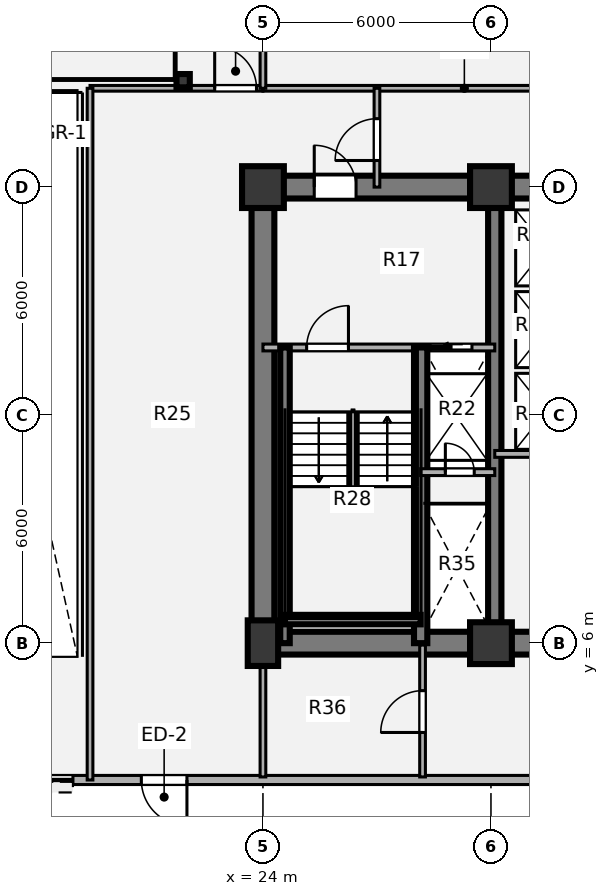
"""IFC4 building model, lengths in metres.
Left out: names, types, materials, properties, quantities, classifications, styles, units other than length and angle.
Written with IfcOpenShell. Run it as: python <this file> out.ifc"""

import sys

from ifc_helpers import new_model, si_unit, direction, frame, frame_2d, origin, origin_2d, place, context, subcontext, project, spatial, rectangle, hollow_rectangle, extrude, source, transform, mapped, element, fill, save


model = new_model("IFC4")
c1 = context("Model", 3, precision=1e-05, world=origin(), true_north=direction((0.0, 1.0)))
c2 = subcontext(c1, "Body", "Model", "MODEL_VIEW")
j1 = project(units=[si_unit("LENGTHUNIT", "METRE"), si_unit("PLANEANGLEUNIT", "RADIAN")], contexts=[c1])
p1 = place(None, origin())
s1 = spatial("IfcSite", under=j1, at=p1, CompositionType="ELEMENT")
p2 = place(p1, origin())
s2 = spatial("IfcBuilding", under=s1, at=p2, CompositionType="ELEMENT")
p3 = place(p2, origin())
s3 = spatial("IfcBuildingStorey", under=s2, at=p3, CompositionType="ELEMENT", Elevation=0.0)
m1 = source(origin(), c2, "Body", "SweptSolid", [
    extrude(rectangle(XDim=0.8, YDim=1.2, at=origin_2d()), origin(), (0.0, 0.0, 1.0), 5.4),
])
p4 = place(p3, frame((24.0, 6.0, 0.0), z_axis=(0.0, 0.0, 1.0), x_axis=(1.0, 0.0, 0.0)))
e1 = element("IfcColumn", 1, at=p4, inside=s3, PredefinedType="COLUMN", context=c2, shape_type="MappedRepresentation", body=[
    mapped(m1, transform((0.0, 0.0, 0.0), x_axis=(1.0, 0.0, 0.0), y_axis=(0.0, 1.0, 0.0), z_axis=(0.0, 0.0, 1.0), scale=1.0)),
])
m2 = source(origin(), c2, "Body", "SweptSolid", [
    extrude(rectangle(XDim=1.1, YDim=1.1, at=origin_2d()), origin(), (0.0, 0.0, 1.0), 5.4),
])
for number, where, z_axis, x_axis in (
    (2, (30.0, 6.0, 0.0), (0.0, 0.0, 1.0), (1.0, 0.0, 0.0)),
    (3, (24.0, 18.0, 0.0), (0.0, 0.0, 1.0), (1.0, 0.0, 0.0)),
    (4, (30.0, 18.0, 0.0), (0.0, 0.0, 1.0), (1.0, 0.0, 0.0)),
):
    element("IfcColumn", number, at=place(p3, frame(where, z_axis=z_axis, x_axis=x_axis)), inside=s3, PredefinedType="COLUMN", context=c2, shape_type="MappedRepresentation", body=[
        mapped(m2, transform((0.0, 0.0, 0.0), x_axis=(1.0, 0.0, 0.0), y_axis=(0.0, 1.0, 0.0), z_axis=(0.0, 0.0, 1.0), scale=1.0)),
    ])
p5 = place(p3, frame((48.3, 6.0, 0.0), z_axis=(0.0, 0.0, 1.0), x_axis=(-1.0, 0.0, 0.0)))
e5 = element("IfcWall", 5, at=p5, inside=s3, PredefinedType="SHEAR", context=c2, shape_type="SweptSolid", body=[
    extrude(rectangle(XDim=24.6, YDim=0.6, at=frame_2d((12.3, 0.0))), origin(), (0.0, 0.0, 1.0), 5.4),
])
p6 = place(p3, frame((24.0, 6.0, 0.0), z_axis=(0.0, 0.0, 1.0), x_axis=(0.0, 1.0, 0.0)))
e6 = element("IfcWall", 6, at=p6, inside=s3, PredefinedType="SHEAR", context=c2, shape_type="SweptSolid", body=[
    extrude(rectangle(XDim=12.0, YDim=0.6, at=frame_2d((6.0, 0.0))), origin(), (0.0, 0.0, 1.0), 5.4),
])
p7 = place(p3, frame((23.7, 18.0, 0.0), z_axis=(0.0, 0.0, 1.0), x_axis=(1.0, 0.0, 0.0)))
e7 = element("IfcWall", 7, at=p7, inside=s3, PredefinedType="SHEAR", context=c2, shape_type="SweptSolid", body=[
    extrude(rectangle(XDim=9.5, YDim=0.6, at=frame_2d((4.75, 0.0))), origin(), (0.0, 0.0, 1.0), 5.4),
])
p8 = place(p7, frame((1.65, 0.0, 0.0)))
e8 = element("IfcOpeningElement", 8, at=p8, cuts=e7, PredefinedType="OPENING", context=c2, shape_type="SweptSolid", body=[
    extrude(rectangle(XDim=1.1, YDim=2.1, at=origin_2d()), frame((0.55, 0.31, 1.05), z_axis=(0.0, -1.0, 0.0), x_axis=(1.0, 0.0, 0.0)), (0.0, 0.0, 1.0), 0.62),
])
p9 = place(p3, frame((30.1, 6.0, 0.0), z_axis=(0.0, 0.0, 1.0), x_axis=(0.0, 1.0, 0.0)))
e9 = element("IfcWall", 9, at=p9, inside=s3, PredefinedType="SHEAR", context=c2, shape_type="SweptSolid", body=[
    extrude(rectangle(XDim=12.0, YDim=0.35, at=frame_2d((6.0, 0.0))), origin(), (0.0, 0.0, 1.0), 5.4),
])
m3 = source(origin(), c2, "Body", "SweptSolid", [
    extrude(hollow_rectangle(XDim=0.35, YDim=0.35, WallThickness=0.016, OuterFilletRadius=0.032, at=origin_2d()), origin(), (0.0, 0.0, 1.0), 5.4),
])
p10 = place(p3, frame((21.9, 20.8, 0.0), z_axis=(0.0, 0.0, 1.0), x_axis=(1.0, 0.0, 0.0)))
e10 = element("IfcColumn", 10, at=p10, inside=s3, PredefinedType="COLUMN", context=c2, shape_type="MappedRepresentation", body=[
    mapped(m3, transform((0.0, 0.0, 0.0), x_axis=(1.0, 0.0, 0.0), y_axis=(0.0, 1.0, 0.0), z_axis=(0.0, 0.0, 1.0), scale=1.0)),
])
p11 = place(p3, frame((61.8, 2.4, 0.0), z_axis=(0.0, 0.0, 1.0), x_axis=(-1.0, 0.0, 0.0)))
e11 = element("IfcWall", 11, at=p11, inside=s3, PredefinedType="SOLIDWALL", context=c2, shape_type="SweptSolid", body=[
    extrude(rectangle(XDim=51.6, YDim=0.24, at=frame_2d((25.8, 0.0))), origin(), (0.0, 0.0, 1.0), 5.12),
])
p12 = place(p11, frame((5.0, 0.0, 0.0)))
e12 = element("IfcOpeningElement", 12, at=p12, cuts=e11, PredefinedType="OPENING", context=c2, shape_type="SweptSolid", body=[
    extrude(rectangle(XDim=3.2, YDim=3.4, at=origin_2d()), frame((1.6, 0.13, 1.7), z_axis=(0.0, -1.0, 0.0), x_axis=(1.0, 0.0, 0.0)), (0.0, 0.0, 1.0), 0.26),
])
p13 = place(p11, frame((11.9, 0.0, 0.0)))
e13 = element("IfcOpeningElement", 13, at=p13, cuts=e11, PredefinedType="OPENING", context=c2, shape_type="SweptSolid", body=[
    extrude(rectangle(XDim=1.2, YDim=2.2, at=origin_2d()), frame((0.6, 0.13, 1.1), z_axis=(0.0, -1.0, 0.0), x_axis=(1.0, 0.0, 0.0)), (0.0, 0.0, 1.0), 0.26),
])
p14 = place(p11, frame((15.8, 0.0, 0.0)))
e14 = element("IfcOpeningElement", 14, at=p14, cuts=e11, PredefinedType="OPENING", context=c2, shape_type="SweptSolid", body=[
    extrude(rectangle(XDim=1.2, YDim=2.2, at=origin_2d()), frame((0.6, 0.13, 1.1), z_axis=(0.0, -1.0, 0.0), x_axis=(1.0, 0.0, 0.0)), (0.0, 0.0, 1.0), 0.26),
])
p15 = place(p11, frame((24.9, 0.0, 0.0)))
e15 = element("IfcOpeningElement", 15, at=p15, cuts=e11, PredefinedType="OPENING", context=c2, shape_type="SweptSolid", body=[
    extrude(rectangle(XDim=1.8, YDim=2.3, at=origin_2d()), frame((0.9, 0.13, 1.15), z_axis=(0.0, -1.0, 0.0), x_axis=(1.0, 0.0, 0.0)), (0.0, 0.0, 1.0), 0.26),
])
p16 = place(p11, frame((39.8, 0.0, 0.0)))
e16 = element("IfcOpeningElement", 16, at=p16, cuts=e11, PredefinedType="OPENING", context=c2, shape_type="SweptSolid", body=[
    extrude(rectangle(XDim=1.2, YDim=2.2, at=origin_2d()), frame((0.6, 0.13, 1.1), z_axis=(0.0, -1.0, 0.0), x_axis=(1.0, 0.0, 0.0)), (0.0, 0.0, 1.0), 0.26),
])
p17 = place(p11, frame((42.8, 0.0, 0.0)))
e17 = element("IfcOpeningElement", 17, at=p17, cuts=e11, PredefinedType="OPENING", context=c2, shape_type="SweptSolid", body=[
    extrude(rectangle(XDim=6.0, YDim=3.6, at=origin_2d()), frame((3.0, 0.13, 1.8), z_axis=(0.0, -1.0, 0.0), x_axis=(1.0, 0.0, 0.0)), (0.0, 0.0, 1.0), 0.26),
])
p18 = place(p11, frame((28.4, 0.0, 1.1)))
e18 = element("IfcOpeningElement", 18, at=p18, cuts=e11, PredefinedType="OPENING", context=c2, shape_type="SweptSolid", body=[
    extrude(rectangle(XDim=1.8, YDim=1.5, at=origin_2d()), frame((0.9, 0.13, 0.75), z_axis=(0.0, -1.0, 0.0), x_axis=(1.0, 0.0, 0.0)), (0.0, 0.0, 1.0), 0.26),
])
p19 = place(p3, frame((30.1, 10.98, 0.0), z_axis=(0.0, 0.0, 1.0), x_axis=(1.0, 0.0, 0.0)))
e19 = element("IfcWall", 19, at=p19, inside=s3, PredefinedType="PARTITIONING", context=c2, shape_type="SweptSolid", body=[
    extrude(rectangle(XDim=4.08, YDim=0.18, at=frame_2d((2.04, 0.0))), origin(), (0.0, 0.0, 1.0), 5.09),
])
p20 = place(p3, frame((24.0, 13.78, 0.0), z_axis=(0.0, 0.0, 1.0), x_axis=(1.0, 0.0, 0.0)))
e20 = element("IfcWall", 20, at=p20, inside=s3, PredefinedType="PARTITIONING", context=c2, shape_type="SweptSolid", body=[
    extrude(rectangle(XDim=6.1, YDim=0.18, at=frame_2d((3.05, 0.0))), origin(), (0.0, 0.0, 1.0), 2.229),
])
p21 = place(p20, frame((1.15, 0.0, 0.0)))
e21 = element("IfcOpeningElement", 21, at=p21, cuts=e20, PredefinedType="OPENING", context=c2, shape_type="SweptSolid", body=[
    extrude(rectangle(XDim=1.1, YDim=2.1, at=origin_2d()), frame((0.55, 0.1, 1.05), z_axis=(0.0, -1.0, 0.0), x_axis=(1.0, 0.0, 0.0)), (0.0, 0.0, 1.0), 0.2),
])
p22 = place(p20, frame((4.4, 0.0, 0.0)))
e22 = element("IfcOpeningElement", 22, at=p22, cuts=e20, PredefinedType="OPENING", context=c2, shape_type="SweptSolid", body=[
    extrude(rectangle(XDim=1.1, YDim=2.1, at=origin_2d()), frame((0.55, 0.1, 1.05), z_axis=(0.0, -1.0, 0.0), x_axis=(1.0, 0.0, 0.0)), (0.0, 0.0, 1.0), 0.2),
])
p23 = place(p3, frame((28.15, 6.0, 0.0), z_axis=(0.0, 0.0, 1.0), x_axis=(0.0, 1.0, 0.0)))
e23 = element("IfcWall", 23, at=p23, inside=s3, PredefinedType="SHEAR", context=c2, shape_type="SweptSolid", body=[
    extrude(rectangle(XDim=7.78, YDim=0.35, at=frame_2d((3.89, 0.0))), origin(), (0.0, 0.0, 1.0), 5.44),
])
p24 = place(p3, frame((24.58, 6.0, 0.0), z_axis=(0.0, 0.0, 1.0), x_axis=(0.0, 1.0, 0.0)))
e24 = element("IfcWall", 24, at=p24, inside=s3, PredefinedType="SHEAR", context=c2, shape_type="SweptSolid", body=[
    extrude(rectangle(XDim=7.78, YDim=0.25, at=frame_2d((3.89, 0.0))), origin(), (0.0, 0.0, 1.0), 5.44),
])
p25 = place(p3, frame((24.58, 6.62, 0.0), z_axis=(0.0, 0.0, 1.0), x_axis=(1.0, 0.0, 0.0)))
e25 = element("IfcWall", 25, at=p25, inside=s3, PredefinedType="SHEAR", context=c2, shape_type="SweptSolid", body=[
    extrude(rectangle(XDim=3.57, YDim=0.25, at=frame_2d((1.785, 0.0))), origin(), (0.0, 0.0, 1.0), 5.44),
])
p26 = place(p3, frame((28.15, 10.5, 0.0), z_axis=(0.0, 0.0, 1.0), x_axis=(1.0, 0.0, 0.0)))
e26 = element("IfcWall", 26, at=p26, inside=s3, PredefinedType="PARTITIONING", context=c2, shape_type="SweptSolid", body=[
    extrude(rectangle(XDim=1.95, YDim=0.18, at=frame_2d((0.975, 0.0))), origin(), (0.0, 0.0, 1.0), 5.09),
])
p27 = place(p26, frame((0.65, 0.0, 0.0)))
e27 = element("IfcOpeningElement", 27, at=p27, cuts=e26, PredefinedType="OPENING", context=c2, shape_type="SweptSolid", body=[
    extrude(rectangle(XDim=0.76, YDim=2.05, at=origin_2d()), frame((0.38, 0.1, 1.025), z_axis=(0.0, -1.0, 0.0), x_axis=(1.0, 0.0, 0.0)), (0.0, 0.0, 1.0), 0.2),
])
p28 = place(p3, frame((19.45, 20.6, 0.0), z_axis=(0.0, 0.0, 1.0), x_axis=(1.0, 0.0, 0.0)))
e28 = element("IfcWall", 28, at=p28, inside=s3, PredefinedType="PARTITIONING", context=c2, shape_type="SweptSolid", body=[
    extrude(rectangle(XDim=4.55, YDim=0.15, at=frame_2d((2.275, 0.0))), origin(), (0.0, 0.0, 1.0), 3.579),
])
p29 = place(p28, frame((3.28, 0.0, 0.0)))
e29 = element("IfcOpeningElement", 29, at=p29, cuts=e28, PredefinedType="OPENING", context=c2, shape_type="SweptSolid", body=[
    extrude(rectangle(XDim=1.1, YDim=2.1, at=origin_2d()), frame((0.55, 0.085, 1.05), z_axis=(0.0, -1.0, 0.0), x_axis=(1.0, 0.0, 0.0)), (0.0, 0.0, 1.0), 0.17),
])
p30 = place(p3, frame((24.0, 20.6, 0.0), z_axis=(0.0, 0.0, 1.0), x_axis=(1.0, 0.0, 0.0)))
e30 = element("IfcWall", 30, at=p30, inside=s3, PredefinedType="PARTITIONING", context=c2, shape_type="SweptSolid", body=[
    extrude(rectangle(XDim=10.6, YDim=0.15, at=frame_2d((5.3, 0.0))), origin(), (0.0, 0.0, 1.0), 5.09),
])
p31 = place(p3, frame((19.45, 2.4, 0.0), z_axis=(0.0, 0.0, 1.0), x_axis=(0.0, 1.0, 0.0)))
e31 = element("IfcWall", 31, at=p31, inside=s3, PredefinedType="PARTITIONING", context=c2, shape_type="SweptSolid", body=[
    extrude(rectangle(XDim=18.2, YDim=0.15, at=frame_2d((9.1, 0.0))), origin(), (0.0, 0.0, 1.0), 5.09),
])
p32 = place(p3, frame((24.0, 2.48, 0.0), z_axis=(0.0, 0.0, 1.0), x_axis=(0.0, 1.0, 0.0)))
e32 = element("IfcWall", 32, at=p32, inside=s3, PredefinedType="PARTITIONING", context=c2, shape_type="SweptSolid", body=[
    extrude(rectangle(XDim=3.47, YDim=0.15, at=frame_2d((1.735, 0.0))), origin(), (0.0, 0.0, 1.0), 5.09),
])
p33 = place(p3, frame((24.0, 20.6, 0.0), z_axis=(0.0, 0.0, 1.0), x_axis=(0.0, 1.0, 0.0)))
e33 = element("IfcWall", 33, at=p33, inside=s3, PredefinedType="PARTITIONING", context=c2, shape_type="SweptSolid", body=[
    extrude(rectangle(XDim=13.85, YDim=0.15, at=frame_2d((6.925, 0.0))), origin(), (0.0, 0.0, 1.0), 4.305),
])
p34 = place(p3, frame((27.0, 18.0, 0.0), z_axis=(0.0, 0.0, 1.0), x_axis=(0.0, 1.0, 0.0)))
e34 = element("IfcWall", 34, at=p34, inside=s3, PredefinedType="PARTITIONING", context=c2, shape_type="SweptSolid", body=[
    extrude(rectangle(XDim=2.6, YDim=0.15, at=frame_2d((1.3, 0.0))), origin(), (0.0, 0.0, 1.0), 5.09),
])
p35 = place(p34, frame((0.7, 0.0, 0.0)))
e35 = element("IfcOpeningElement", 35, at=p35, cuts=e34, PredefinedType="OPENING", context=c2, shape_type="SweptSolid", body=[
    extrude(rectangle(XDim=1.1, YDim=2.1, at=origin_2d()), frame((0.55, 0.085, 1.05), z_axis=(0.0, -1.0, 0.0), x_axis=(1.0, 0.0, 0.0)), (0.0, 0.0, 1.0), 0.17),
])
p36 = place(p3, frame((28.2, 2.48, 0.0), z_axis=(0.0, 0.0, 1.0), x_axis=(0.0, 1.0, 0.0)))
e36 = element("IfcWall", 36, at=p36, inside=s3, PredefinedType="PARTITIONING", context=c2, shape_type="SweptSolid", body=[
    extrude(rectangle(XDim=3.47, YDim=0.15, at=frame_2d((1.735, 0.0))), origin(), (0.0, 0.0, 1.0), 5.09),
])
p37 = place(p36, frame((1.17, 0.0, 0.0)))
e37 = element("IfcOpeningElement", 37, at=p37, cuts=e36, PredefinedType="OPENING", context=c2, shape_type="SweptSolid", body=[
    extrude(rectangle(XDim=1.1, YDim=2.1, at=origin_2d()), frame((0.55, 0.085, 1.05), z_axis=(0.0, -1.0, 0.0), x_axis=(1.0, 0.0, 0.0)), (0.0, 0.0, 1.0), 0.17),
])
m4 = source(origin(), c2, "Body", "SweptSolid", [
    extrude(rectangle(XDim=1.2, YDim=2.2, at=origin_2d()), frame((0.6, 0.025, 1.1), z_axis=(0.0, -1.0, 0.0), x_axis=(1.0, 0.0, 0.0)), (0.0, 0.0, 1.0), 0.05),
])
p38 = place(p16, origin())
e38 = element("IfcDoor", 38, at=p38, inside=s3, OperationType="SINGLE_SWING_LEFT", PredefinedType="DOOR", context=c2, shape_type="MappedRepresentation", body=[
    mapped(m4, transform((0.0, 0.0, 0.0), x_axis=(1.0, 0.0, 0.0), y_axis=(0.0, 1.0, 0.0), z_axis=(0.0, 0.0, 1.0), scale=1.0)),
])
fill(e16, e38)
m5 = source(origin(), c2, "Body", "SweptSolid", [
    extrude(rectangle(XDim=6.0, YDim=3.6, at=origin_2d()), frame((3.0, 0.025, 1.8), z_axis=(0.0, -1.0, 0.0), x_axis=(1.0, 0.0, 0.0)), (0.0, 0.0, 1.0), 0.05),
])
p39 = place(p17, origin())
e39 = element("IfcDoor", 39, at=p39, inside=s3, OperationType="ROLLINGUP", PredefinedType="GATE", context=c2, shape_type="MappedRepresentation", body=[
    mapped(m5, transform((0.0, 0.0, 0.0), x_axis=(1.0, 0.0, 0.0), y_axis=(0.0, 1.0, 0.0), z_axis=(0.0, 0.0, 1.0), scale=1.0)),
])
fill(e17, e39)
m6 = source(origin(), c2, "Body", "SweptSolid", [
    extrude(rectangle(XDim=1.1, YDim=2.1, at=origin_2d()), frame((0.55, 0.025, 1.05), z_axis=(0.0, -1.0, 0.0), x_axis=(1.0, 0.0, 0.0)), (0.0, 0.0, 1.0), 0.05),
])
p40 = place(p21, origin())
e40 = element("IfcDoor", 40, at=p40, inside=s3, OperationType="SINGLE_SWING_RIGHT", PredefinedType="DOOR", context=c2, shape_type="MappedRepresentation", body=[
    mapped(m6, transform((0.0, 0.0, 0.0), x_axis=(1.0, 0.0, 0.0), y_axis=(0.0, 1.0, 0.0), z_axis=(0.0, 0.0, 1.0), scale=1.0)),
])
fill(e21, e40)
m7 = source(origin(), c2, "Body", "SweptSolid", [
    extrude(rectangle(XDim=1.1, YDim=2.1, at=origin_2d()), frame((0.55, 0.025, 1.05), z_axis=(0.0, -1.0, 0.0), x_axis=(1.0, 0.0, 0.0)), (0.0, 0.0, 1.0), 0.05),
])
p41 = place(p22, origin())
e41 = element("IfcDoor", 41, at=p41, inside=s3, OperationType="SLIDING_TO_LEFT", PredefinedType="DOOR", context=c2, shape_type="MappedRepresentation", body=[
    mapped(m7, transform((0.0, 0.0, 0.0), x_axis=(1.0, 0.0, 0.0), y_axis=(0.0, 1.0, 0.0), z_axis=(0.0, 0.0, 1.0), scale=1.0)),
])
fill(e22, e41)
m8 = source(origin(), c2, "Body", "SweptSolid", [
    extrude(rectangle(XDim=0.76, YDim=2.05, at=origin_2d()), frame((0.38, 0.025, 1.025), z_axis=(0.0, -1.0, 0.0), x_axis=(1.0, 0.0, 0.0)), (0.0, 0.0, 1.0), 0.05),
])
p42 = place(p27, origin())
e42 = element("IfcDoor", 42, at=p42, inside=s3, OperationType="SINGLE_SWING_LEFT", PredefinedType="DOOR", context=c2, shape_type="MappedRepresentation", body=[
    mapped(m8, transform((0.0, 0.0, 0.0), x_axis=(1.0, 0.0, 0.0), y_axis=(0.0, 1.0, 0.0), z_axis=(0.0, 0.0, 1.0), scale=1.0)),
])
fill(e27, e42)
m9 = source(origin(), c2, "Body", "SweptSolid", [
    extrude(rectangle(XDim=1.1, YDim=2.1, at=origin_2d()), frame((0.55, 0.025, 1.05), z_axis=(0.0, -1.0, 0.0), x_axis=(1.0, 0.0, 0.0)), (0.0, 0.0, 1.0), 0.05),
])
p43 = place(p8, origin())
e43 = element("IfcDoor", 43, at=p43, inside=s3, OperationType="SINGLE_SWING_LEFT", PredefinedType="DOOR", context=c2, shape_type="MappedRepresentation", body=[
    mapped(m9, transform((0.0, 0.0, 0.0), x_axis=(1.0, 0.0, 0.0), y_axis=(0.0, 1.0, 0.0), z_axis=(0.0, 0.0, 1.0), scale=1.0)),
])
fill(e8, e43)
p44 = place(p29, origin())
e44 = element("IfcDoor", 44, at=p44, inside=s3, OperationType="SINGLE_SWING_LEFT", PredefinedType="DOOR", context=c2, shape_type="MappedRepresentation", body=[
    mapped(m6, transform((0.0, 0.0, 0.0), x_axis=(1.0, 0.0, 0.0), y_axis=(0.0, 1.0, 0.0), z_axis=(0.0, 0.0, 1.0), scale=1.0)),
])
fill(e29, e44)
p45 = place(p35, origin())
e45 = element("IfcDoor", 45, at=p45, inside=s3, OperationType="SINGLE_SWING_LEFT", PredefinedType="DOOR", context=c2, shape_type="MappedRepresentation", body=[
    mapped(m6, transform((0.0, 0.0, 0.0), x_axis=(1.0, 0.0, 0.0), y_axis=(0.0, 1.0, 0.0), z_axis=(0.0, 0.0, 1.0), scale=1.0)),
])
fill(e35, e45)
m10 = source(origin(), c2, "Body", "SweptSolid", [
    extrude(rectangle(XDim=1.1, YDim=2.1, at=origin_2d()), frame((0.55, 0.025, 1.05), z_axis=(0.0, -1.0, 0.0), x_axis=(1.0, 0.0, 0.0)), (0.0, 0.0, 1.0), 0.05),
])
p46 = place(p37, origin())
e46 = element("IfcDoor", 46, at=p46, inside=s3, OperationType="SINGLE_SWING_LEFT", PredefinedType="DOOR", context=c2, shape_type="MappedRepresentation", body=[
    mapped(m10, transform((0.0, 0.0, 0.0), x_axis=(1.0, 0.0, 0.0), y_axis=(0.0, 1.0, 0.0), z_axis=(0.0, 0.0, 1.0), scale=1.0)),
])
fill(e37, e46)
save(model, sys.argv[1])
